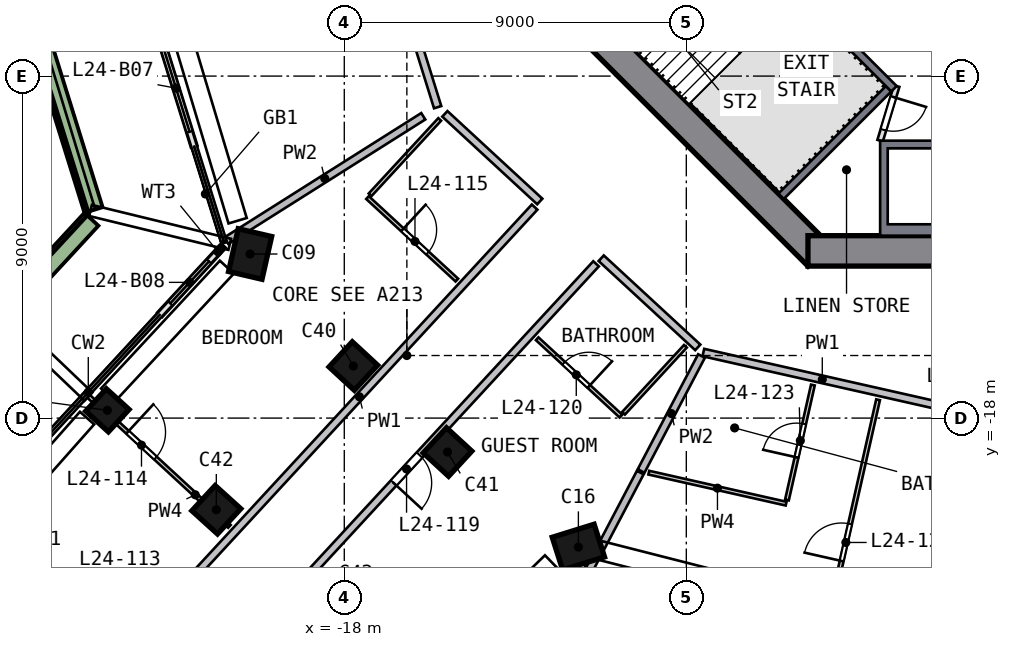
"""IFC4 building model, lengths in metres.
Left out: names, types, materials, properties, quantities, classifications, styles, units other than length and angle.
Written with IfcOpenShell. Run it as: python <this file> out.ifc"""

import sys

from ifc_helpers import new_model, si_unit, direction, frame, frame_2d, origin, origin_2d, place, context, subcontext, project, spatial, polyline, rectangle, outline, extrude, element, fill, save


model = new_model("IFC4")
c1 = context("Model", 3, precision=1e-05, world=origin(), true_north=direction((0.0, 1.0)))
c2 = subcontext(c1, "Body", "Model", "MODEL_VIEW")
j1 = project(units=[si_unit("LENGTHUNIT", "METRE"), si_unit("PLANEANGLEUNIT", "RADIAN")], contexts=[c1])
p1 = place(None, origin())
s1 = spatial("IfcSite", under=j1, at=p1, CompositionType="ELEMENT")
p2 = place(p1, origin())
s2 = spatial("IfcBuilding", under=s1, at=p2, CompositionType="ELEMENT")
p3 = place(p2, frame((0.0, 0.0, 103.5)))
s3 = spatial("IfcBuildingStorey", under=s2, at=p3, CompositionType="ELEMENT", Elevation=103.5)
p4 = place(p3, frame((-20.557, -13.565, 0.0), z_axis=(0.06529081, -0.09721414, 0.99311959), x_axis=(0.226403708, 0.970731294, 0.08013811)))
e1 = element("IfcColumn", 1, at=p4, inside=s3, PredefinedType="COLUMN", context=c2, shape_type="SweptSolid", body=[
    extrude(rectangle(XDim=1.15, YDim=0.9, at=origin_2d()), origin(), (0.0, 0.0, 1.0), 3.212),
])
p5 = place(p3, frame((-24.402, -17.729, 0.0), z_axis=(0.138196736, -0.055097056, 0.988871062), x_axis=(-0.671941399, -0.738723667, 0.052745612)))
e2 = element("IfcColumn", 2, at=p5, inside=s3, PredefinedType="COLUMN", context=c2, shape_type="SweptSolid", body=[
    extrude(rectangle(XDim=0.8, YDim=0.8, at=origin_2d()), origin(), (0.0, 0.0, 1.0), 3.226),
])
p6 = place(p3, frame((-11.963, -21.328, 0.0), z_axis=(0.101860909, -0.0560235, 0.993219876), x_axis=(-0.949753388, -0.302512886, 0.080339625)))
e3 = element("IfcColumn", 3, at=p6, inside=s3, PredefinedType="COLUMN", context=c2, shape_type="SweptSolid", body=[
    extrude(rectangle(XDim=1.15, YDim=0.9, at=origin_2d()), origin(), (0.0, 0.0, 1.0), 3.212),
])
for number, where, z_axis, x_axis in (
    (4, (-17.858, -16.529, 0.0), (0.079, -0.084, 0.993), (-0.679, -0.734, -0.008)),
    (5, (-15.392, -18.806, 0.0), (0.09, -0.072, 0.993), (-0.677, -0.736, 0.008)),
):
    element("IfcColumn", number, at=place(p3, frame(where, z_axis=z_axis, x_axis=x_axis)), inside=s3, PredefinedType="COLUMN", context=c2, shape_type="SweptSolid", body=[
        extrude(rectangle(XDim=0.9, YDim=0.9, at=origin_2d()), origin(), (0.0, 0.0, 1.0), 3.211),
    ])
p7 = place(p3, frame((-21.55, -20.362, 0.0), z_axis=(0.150364243, -0.041427655, 0.987762291), x_axis=(-0.669237704, -0.739662492, 0.070854029)))
e6 = element("IfcColumn", 6, at=p7, inside=s3, PredefinedType="COLUMN", context=c2, shape_type="SweptSolid", body=[
    extrude(rectangle(XDim=0.9, YDim=0.9, at=origin_2d()), origin(), (0.0, 0.0, 1.0), 3.229),
])
p8 = place(p3, frame((-13.717, -5.516, 0.0), z_axis=(0.0, 0.0, 1.0), x_axis=(0.707106781, -0.707106781, 0.0)))
e7 = element("IfcWall", 7, at=p8, inside=s3, PredefinedType="SHEAR", context=c2, shape_type="SweptSolid", body=[
    extrude(rectangle(XDim=11.598, YDim=0.8, at=frame_2d((5.799, 0.0))), origin(), (0.0, 0.0, 1.0), 3.5),
])
p9 = place(p8, frame((2.099, 0.0, 0.0)))
e8 = element("IfcOpeningElement", 8, at=p9, cuts=e7, PredefinedType="OPENING", context=c2, shape_type="SweptSolid", body=[
    extrude(rectangle(XDim=1.2, YDim=2.1, at=frame_2d((0.6, 1.05))), frame((0.0, 0.41, 0.0), z_axis=(0.0, -1.0, 0.0), x_axis=(1.0, 0.0, 0.0)), (0.0, 0.0, 1.0), 0.82),
])
p10 = place(p3, frame((-5.799, -13.6, 0.0), z_axis=(0.0, 0.0, 1.0), x_axis=(1.0, 0.0, 0.0)))
e9 = element("IfcWall", 9, at=p10, inside=s3, PredefinedType="SHEAR", context=c2, shape_type="SweptSolid", body=[
    extrude(rectangle(XDim=11.598, YDim=0.8, at=frame_2d((5.799, 0.0))), origin(), (0.0, 0.0, 1.0), 3.5),
])
p11 = place(p10, frame((4.899, 0.0, 0.0)))
e10 = element("IfcOpeningElement", 10, at=p11, cuts=e9, PredefinedType="OPENING", context=c2, shape_type="SweptSolid", body=[
    extrude(rectangle(XDim=1.8, YDim=2.1, at=frame_2d((0.9, 1.05))), frame((0.0, 0.41, 0.0), z_axis=(0.0, -1.0, 0.0), x_axis=(1.0, 0.0, 0.0)), (0.0, 0.0, 1.0), 0.82),
])
p12 = place(p3, frame((-23.092, -7.183, 0.0), z_axis=(0.0, 0.0, 1.0), x_axis=(0.297049788, -0.954861992, 0.0)))
e11 = element("IfcWall", 11, at=p12, inside=s3, PredefinedType="SOLIDWALL", context=c2, shape_type="SweptSolid", body=[
    extrude(rectangle(XDim=3.836, YDim=0.15, at=frame_2d((1.918, 0.0))), origin(), (0.0, 0.0, 1.0), 2.425),
])
p13 = place(p12, frame((1.035, 0.0, 0.0)))
e12 = element("IfcOpeningElement", 12, at=p13, cuts=e11, PredefinedType="OPENING", context=c2, shape_type="SweptSolid", body=[
    extrude(rectangle(XDim=2.4, YDim=2.4, at=frame_2d((1.2, 1.2))), frame((0.0, 0.085, 0.0), z_axis=(0.0, -1.0, 0.0), x_axis=(1.0, 0.0, 0.0)), (0.0, 0.0, 1.0), 0.17),
])
p14 = place(p3, frame((-21.225, -13.515, 0.0), z_axis=(0.0, 0.0, 1.0), x_axis=(-0.678394477, -0.734697852, 0.0)))
e13 = element("IfcWall", 13, at=p14, inside=s3, PredefinedType="SOLIDWALL", context=c2, shape_type="SweptSolid", body=[
    extrude(rectangle(XDim=2.394, YDim=0.15, at=frame_2d((1.197, 0.0))), origin(), (0.0, 0.0, 1.0), 2.425),
])
p15 = place(p14, frame((0.494, 0.0, 0.0)))
e14 = element("IfcOpeningElement", 14, at=p15, cuts=e13, PredefinedType="OPENING", context=c2, shape_type="SweptSolid", body=[
    extrude(rectangle(XDim=1.5, YDim=2.4, at=frame_2d((0.75, 1.2))), frame((0.0, 0.085, 0.0), z_axis=(0.0, -1.0, 0.0), x_axis=(1.0, 0.0, 0.0)), (0.0, 0.0, 1.0), 0.17),
])
p16 = place(p3, frame((-27.762, -2.353, 0.0), z_axis=(0.0, 0.0, 1.0), x_axis=(0.297028475, -0.954868622, 0.0)))
e15 = element("IfcWall", 15, at=p16, inside=s3, PredefinedType="SOLIDWALL", context=c2, shape_type="SweptSolid", body=[
    extrude(rectangle(XDim=10.652, YDim=0.5, at=frame_2d((5.326, 0.0))), origin(), (0.0, 0.0, 1.0), 0.7),
])
p17 = place(p3, frame((-24.653, -12.768, 0.0), z_axis=(0.0, 0.0, 1.0), x_axis=(-0.678410385, -0.734683162, 0.0)))
e16 = element("IfcWall", 16, at=p17, inside=s3, PredefinedType="SOLIDWALL", context=c2, shape_type="SweptSolid", body=[
    extrude(rectangle(XDim=8.794, YDim=0.5, at=frame_2d((4.397, 0.0))), origin(), (0.0, 0.0, 1.0), 0.7),
])
p18 = place(p3, origin())
e17 = element("IfcWall", 17, at=p18, inside=s3, PredefinedType="SOLIDWALL", context=c2, shape_type="SweptSolid", body=[
    extrude(outline(polyline([(-1.2, -13.2), (-3.9, -13.2), (-3.9, -10.7), (-1.2, -10.7), (-1.2, -13.2)]), holes=[polyline([(-3.7, -10.9), (-3.7, -12.9), (-1.4, -12.9), (-1.4, -10.9), (-3.7, -10.9)])]), origin(), (0.0, 0.0, 1.0), 3.19),
])
p19 = place(p3, frame((-3.535, -9.334, 0.0), z_axis=(0.0, 0.0, 1.0), x_axis=(-0.707106781, 0.707106781, 0.0)))
e18 = element("IfcWall", 18, at=p19, inside=s3, PredefinedType="SOLIDWALL", context=c2, shape_type="SweptSolid", body=[
    extrude(rectangle(XDim=8.2, YDim=0.2, at=frame_2d((4.1, 0.0))), origin(), (0.0, 0.0, 1.0), 3.19),
])
p20 = place(p19, frame((6.6, 0.0, 0.0)))
e19 = element("IfcOpeningElement", 19, at=p20, cuts=e18, PredefinedType="OPENING", context=c2, shape_type="SweptSolid", body=[
    extrude(rectangle(XDim=1.2, YDim=2.1, at=frame_2d((0.6, 1.05))), frame((0.0, 0.11, 0.0), z_axis=(0.0, -1.0, 0.0), x_axis=(1.0, 0.0, 0.0)), (0.0, 0.0, 1.0), 0.22),
])
p21 = place(p3, frame((-3.677, -9.334, 0.0), z_axis=(0.0, 0.0, 1.0), x_axis=(-0.707106781, -0.707106781, 0.0)))
e20 = element("IfcWall", 20, at=p21, inside=s3, PredefinedType="SOLIDWALL", context=c2, shape_type="SweptSolid", body=[
    extrude(rectangle(XDim=4.0, YDim=0.2, at=frame_2d((2.0, 0.0))), origin(), (0.0, 0.0, 1.0), 3.19),
])
p22 = place(p3, frame((-3.465, -9.263, 0.0), z_axis=(0.0, 0.0, 1.0), x_axis=(-0.289808785, -0.957084567, 0.0)))
e21 = element("IfcWall", 21, at=p22, inside=s3, PredefinedType="PARTITIONING", context=c2, shape_type="SweptSolid", body=[
    extrude(rectangle(XDim=1.501, YDim=0.15, at=frame_2d((0.75, 0.0))), origin(), (0.0, 0.0, 1.0), 3.19),
])
p23 = place(p22, frame((0.301, 0.0, 0.0)))
e22 = element("IfcOpeningElement", 22, at=p23, cuts=e21, PredefinedType="OPENING", context=c2, shape_type="SweptSolid", body=[
    extrude(rectangle(XDim=0.9, YDim=2.1, at=frame_2d((0.45, 1.05))), frame((0.0, 0.085, 0.0), z_axis=(0.0, -1.0, 0.0), x_axis=(1.0, 0.0, 0.0)), (0.0, 0.0, 1.0), 0.17),
])
p24 = place(p3, frame((-24.485, -24.894, 0.0), z_axis=(0.0, 0.0, 1.0), x_axis=(0.678409972, 0.734683544, 0.0)))
e23 = element("IfcWall", 23, at=p24, inside=s3, PredefinedType="SOLIDWALL", context=c2, shape_type="SweptSolid", body=[
    extrude(rectangle(XDim=16.942, YDim=0.2, at=frame_2d((8.471, 0.0))), origin(), (0.0, 0.0, 1.0), 3.19),
])
p25 = place(p24, frame((2.15, 0.0, 0.0)))
e24 = element("IfcOpeningElement", 24, at=p25, cuts=e23, PredefinedType="OPENING", context=c2, shape_type="SweptSolid", body=[
    extrude(rectangle(XDim=1.0, YDim=2.1, at=frame_2d((0.5, 1.05))), frame((0.0, 0.11, 0.0), z_axis=(0.0, -1.0, 0.0), x_axis=(1.0, 0.0, 0.0)), (0.0, 0.0, 1.0), 0.22),
])
p26 = place(p3, frame((-11.375, -13.94, 0.0), z_axis=(0.0, 0.0, 1.0), x_axis=(-0.67841775, -0.734676361, 0.0)))
e25 = element("IfcWall", 25, at=p26, inside=s3, PredefinedType="SOLIDWALL", context=c2, shape_type="SweptSolid", body=[
    extrude(rectangle(XDim=16.942, YDim=0.2, at=frame_2d((8.471, 0.0))), origin(), (0.0, 0.0, 1.0), 3.19),
])
p27 = place(p26, frame((6.85, 0.0, 0.0)))
e26 = element("IfcOpeningElement", 26, at=p27, cuts=e25, PredefinedType="OPENING", context=c2, shape_type="SweptSolid", body=[
    extrude(rectangle(XDim=1.0, YDim=2.1, at=frame_2d((0.5, 1.05))), frame((0.0, 0.11, 0.0), z_axis=(0.0, -1.0, 0.0), x_axis=(1.0, 0.0, 0.0)), (0.0, 0.0, 1.0), 0.22),
])
p28 = place(p3, frame((-18.37, -0.732, 0.0), z_axis=(0.0, 0.0, 1.0), x_axis=(0.297037443, -0.954865832, 0.0)))
e27 = element("IfcWall", 27, at=p28, inside=s3, PredefinedType="SOLIDWALL", context=c2, shape_type="SweptSolid", body=[
    extrude(rectangle(XDim=9.516, YDim=0.2, at=frame_2d((4.758, 0.0))), origin(), (0.0, 0.0, 1.0), 3.19),
])
p29 = place(p3, frame((-15.354, -9.994, 0.0), z_axis=(0.0, 0.0, 1.0), x_axis=(0.734696063, -0.678396414, 0.0)))
e28 = element("IfcWall", 28, at=p29, inside=s3, PredefinedType="SOLIDWALL", context=c2, shape_type="SweptSolid", body=[
    extrude(rectangle(XDim=3.4, YDim=0.2, at=frame_2d((1.7, 0.0))), origin(), (0.0, 0.0, 1.0), 3.19),
])
p30 = place(p3, frame((-11.24, -13.793, 0.0), z_axis=(0.0, 0.0, 1.0), x_axis=(0.734711421, -0.678379781, 0.0)))
e29 = element("IfcWall", 29, at=p30, inside=s3, PredefinedType="SOLIDWALL", context=c2, shape_type="SweptSolid", body=[
    extrude(rectangle(XDim=3.458, YDim=0.2, at=frame_2d((1.729, 0.0))), origin(), (0.0, 0.0, 1.0), 3.19),
])
p31 = place(p3, frame((0.731, -18.37, 0.0), z_axis=(0.0, 0.0, 1.0), x_axis=(-0.9754634, 0.220161658, 0.0)))
e30 = element("IfcWall", 30, at=p31, inside=s3, PredefinedType="SOLIDWALL", context=c2, shape_type="SweptSolid", body=[
    extrude(rectangle(XDim=9.517, YDim=0.2, at=frame_2d((4.758, 0.0))), origin(), (0.0, 0.0, 1.0), 3.19),
])
p32 = place(p31, frame((1.9, 0.0, 0.0)))
e31 = element("IfcOpeningElement", 31, at=p32, cuts=e30, PredefinedType="OPENING", context=c2, shape_type="SweptSolid", body=[
    extrude(rectangle(XDim=1.0, YDim=2.1, at=frame_2d((0.5, 1.05))), frame((0.0, 0.11, 0.0), z_axis=(0.0, -1.0, 0.0), x_axis=(1.0, 0.0, 0.0)), (0.0, 0.0, 1.0), 0.22),
])
p33 = place(p3, frame((-15.921, -10.057, 0.0), z_axis=(0.0, 0.0, 1.0), x_axis=(-0.845445381, -0.534061895, 0.0)))
e32 = element("IfcWall", 32, at=p33, inside=s3, PredefinedType="SOLIDWALL", context=c2, shape_type="SweptSolid", body=[
    extrude(rectangle(XDim=6.132, YDim=0.2, at=frame_2d((3.066, 0.0))), origin(), (0.0, 0.0, 1.0), 3.19),
])
p34 = place(p3, frame((-10.211, -19.433, 0.0), z_axis=(0.0, 0.0, 1.0), x_axis=(-0.465151616, -0.885231029, 0.0)))
e33 = element("IfcWall", 33, at=p34, inside=s3, PredefinedType="SOLIDWALL", context=c2, shape_type="SweptSolid", body=[
    extrude(rectangle(XDim=3.012, YDim=0.2, at=frame_2d((1.506, 0.0))), origin(), (0.0, 0.0, 1.0), 3.19),
])
p35 = place(p3, frame((-8.6, -16.366, 0.0), z_axis=(0.0, 0.0, 1.0), x_axis=(-0.465148797, -0.88523251, 0.0)))
e34 = element("IfcWall", 34, at=p35, inside=s3, PredefinedType="SOLIDWALL", context=c2, shape_type="SweptSolid", body=[
    extrude(rectangle(XDim=3.418, YDim=0.2, at=frame_2d((1.709, 0.0))), origin(), (0.0, 0.0, 1.0), 3.19),
])
p36 = place(p3, frame((-24.732, -17.423, 0.0), z_axis=(0.0, 0.0, 1.0), x_axis=(0.734660708, -0.678434701, 0.0)))
e35 = element("IfcWall", 35, at=p36, inside=s3, PredefinedType="PARTITIONING", context=c2, shape_type="SweptSolid", body=[
    extrude(rectangle(XDim=5.05, YDim=0.1, at=frame_2d((2.525, 0.0))), origin(), (0.0, 0.0, 1.0), 3.19),
])
p37 = place(p36, frame((1.4, 0.0, 0.0)))
e36 = element("IfcOpeningElement", 36, at=p37, cuts=e35, PredefinedType="OPENING", context=c2, shape_type="SweptSolid", body=[
    extrude(rectangle(XDim=1.0, YDim=2.1, at=frame_2d((0.5, 1.05))), frame((0.0, 0.06, 0.0), z_axis=(0.0, -1.0, 0.0), x_axis=(1.0, 0.0, 0.0)), (0.0, 0.0, 1.0), 0.12),
])
p38 = place(p3, frame((-15.489, -10.141, 0.0), z_axis=(0.0, 0.0, 1.0), x_axis=(-0.678426553, -0.734668232, 0.0)))
e37 = element("IfcWall", 37, at=p38, inside=s3, PredefinedType="PARTITIONING", context=c2, shape_type="SweptSolid", body=[
    extrude(rectangle(XDim=2.7, YDim=0.1, at=frame_2d((1.35, 0.0))), origin(), (0.0, 0.0, 1.0), 3.19),
])
p39 = place(p3, frame((-17.389, -12.198, 0.0), z_axis=(0.0, 0.0, 1.0), x_axis=(0.734698137, -0.678394168, 0.0)))
e38 = element("IfcWall", 38, at=p39, inside=s3, PredefinedType="PARTITIONING", context=c2, shape_type="SweptSolid", body=[
    extrude(rectangle(XDim=3.2, YDim=0.1, at=frame_2d((1.6, 0.0))), origin(), (0.0, 0.0, 1.0), 3.19),
])
p40 = place(p39, frame((1.25, 0.0, 0.0)))
e39 = element("IfcOpeningElement", 39, at=p40, cuts=e38, PredefinedType="OPENING", context=c2, shape_type="SweptSolid", body=[
    extrude(rectangle(XDim=0.9, YDim=2.1, at=frame_2d((0.45, 1.05))), frame((0.0, 0.06, 0.0), z_axis=(0.0, -1.0, 0.0), x_axis=(1.0, 0.0, 0.0)), (0.0, 0.0, 1.0), 0.12),
])
p41 = place(p3, frame((-12.924, -15.912, 0.0), z_axis=(0.0, 0.0, 1.0), x_axis=(0.734663036, -0.678432181, 0.0)))
e40 = element("IfcWall", 40, at=p41, inside=s3, PredefinedType="PARTITIONING", context=c2, shape_type="SweptSolid", body=[
    extrude(rectangle(XDim=3.0, YDim=0.1, at=frame_2d((1.5, 0.0))), origin(), (0.0, 0.0, 1.0), 3.19),
])
p42 = place(p41, frame((0.95, 0.0, 0.0)))
e41 = element("IfcOpeningElement", 41, at=p42, cuts=e40, PredefinedType="OPENING", context=c2, shape_type="SweptSolid", body=[
    extrude(rectangle(XDim=0.9, YDim=2.1, at=frame_2d((0.45, 1.05))), frame((0.0, 0.06, 0.0), z_axis=(0.0, -1.0, 0.0), x_axis=(1.0, 0.0, 0.0)), (0.0, 0.0, 1.0), 0.12),
])
p43 = place(p3, frame((-9.024, -16.111, 0.0), z_axis=(0.0, 0.0, 1.0), x_axis=(-0.678419519, -0.734674728, 0.0)))
e42 = element("IfcWall", 42, at=p43, inside=s3, PredefinedType="PARTITIONING", context=c2, shape_type="SweptSolid", body=[
    extrude(rectangle(XDim=2.4, YDim=0.1, at=frame_2d((1.2, 0.0))), origin(), (0.0, 0.0, 1.0), 3.19),
])
p44 = place(p3, frame((-9.987, -19.436, 0.0), z_axis=(0.0, 0.0, 1.0), x_axis=(0.975451051, -0.220216363, 0.0)))
e43 = element("IfcWall", 43, at=p44, inside=s3, PredefinedType="PARTITIONING", context=c2, shape_type="SweptSolid", body=[
    extrude(rectangle(XDim=3.704, YDim=0.1, at=frame_2d((1.852, 0.0))), origin(), (0.0, 0.0, 1.0), 3.19),
])
p45 = place(p3, frame((-6.352, -20.154, 0.0), z_axis=(0.0, 0.0, 1.0), x_axis=(0.220123085, 0.975472105, 0.0)))
e44 = element("IfcWall", 44, at=p45, inside=s3, PredefinedType="PARTITIONING", context=c2, shape_type="SweptSolid", body=[
    extrude(rectangle(XDim=3.1, YDim=0.1, at=frame_2d((1.55, 0.0))), origin(), (0.0, 0.0, 1.0), 3.19),
])
p46 = place(p45, frame((1.15, 0.0, 0.0)))
e45 = element("IfcOpeningElement", 45, at=p46, cuts=e44, PredefinedType="OPENING", context=c2, shape_type="SweptSolid", body=[
    extrude(rectangle(XDim=0.9, YDim=2.1, at=frame_2d((0.45, 1.05))), frame((0.0, 0.06, 0.0), z_axis=(0.0, -1.0, 0.0), x_axis=(1.0, 0.0, 0.0)), (0.0, 0.0, 1.0), 0.12),
])
p47 = place(p3, frame((-5.308, -23.517, 0.0), z_axis=(0.0, 0.0, 1.0), x_axis=(0.220203604, 0.975453932, 0.0)))
e46 = element("IfcWall", 46, at=p47, inside=s3, PredefinedType="PARTITIONING", context=c2, shape_type="SweptSolid", body=[
    extrude(rectangle(XDim=6.15, YDim=0.1, at=frame_2d((3.075, 0.0))), origin(), (0.0, 0.0, 1.0), 3.19),
])
p48 = place(p47, frame((1.8, 0.0, 0.0)))
e47 = element("IfcOpeningElement", 47, at=p48, cuts=e46, PredefinedType="OPENING", context=c2, shape_type="SweptSolid", body=[
    extrude(rectangle(XDim=1.0, YDim=2.1, at=frame_2d((0.5, 1.05))), frame((0.0, 0.06, 0.0), z_axis=(0.0, -1.0, 0.0), x_axis=(1.0, 0.0, 0.0)), (0.0, 0.0, 1.0), 0.12),
])
p49 = place(p13, origin())
e48 = element("IfcDoor", 48, at=p49, inside=s3, OperationType="SLIDING_TO_LEFT", PredefinedType="DOOR", context=c2, shape_type="SweptSolid", body=[
    extrude(rectangle(XDim=2.4, YDim=2.4, at=frame_2d((1.2, 1.2))), frame((0.0, 0.025, 0.0), z_axis=(0.0, -1.0, 0.0), x_axis=(1.0, 0.0, 0.0)), (0.0, 0.0, 1.0), 0.05),
])
fill(e12, e48)
p50 = place(p15, origin())
e49 = element("IfcDoor", 49, at=p50, inside=s3, OperationType="SLIDING_TO_LEFT", PredefinedType="DOOR", context=c2, shape_type="SweptSolid", body=[
    extrude(rectangle(XDim=1.5, YDim=2.4, at=frame_2d((0.75, 1.2))), frame((0.0, 0.025, 0.0), z_axis=(0.0, -1.0, 0.0), x_axis=(1.0, 0.0, 0.0)), (0.0, 0.0, 1.0), 0.05),
])
fill(e14, e49)
p51 = place(p23, origin())
e50 = element("IfcDoor", 50, at=p51, inside=s3, OperationType="SINGLE_SWING_LEFT", PredefinedType="DOOR", context=c2, shape_type="SweptSolid", body=[
    extrude(rectangle(XDim=0.9, YDim=2.1, at=frame_2d((0.45, 1.05))), frame((0.0, 0.025, 0.0), z_axis=(0.0, -1.0, 0.0), x_axis=(1.0, 0.0, 0.0)), (0.0, 0.0, 1.0), 0.05),
])
fill(e22, e50)
p52 = place(p37, origin())
e51 = element("IfcDoor", 51, at=p52, inside=s3, OperationType="SINGLE_SWING_LEFT", PredefinedType="DOOR", context=c2, shape_type="SweptSolid", body=[
    extrude(rectangle(XDim=1.0, YDim=2.1, at=frame_2d((0.5, 1.05))), frame((0.0, 0.025, 0.0), z_axis=(0.0, -1.0, 0.0), x_axis=(1.0, 0.0, 0.0)), (0.0, 0.0, 1.0), 0.05),
])
fill(e36, e51)
p53 = place(p40, origin())
e52 = element("IfcDoor", 52, at=p53, inside=s3, OperationType="SINGLE_SWING_LEFT", PredefinedType="DOOR", context=c2, shape_type="SweptSolid", body=[
    extrude(rectangle(XDim=0.9, YDim=2.1, at=frame_2d((0.45, 1.05))), frame((0.0, 0.025, 0.0), z_axis=(0.0, -1.0, 0.0), x_axis=(1.0, 0.0, 0.0)), (0.0, 0.0, 1.0), 0.05),
])
fill(e39, e52)
p54 = place(p27, origin())
e53 = element("IfcDoor", 53, at=p54, inside=s3, OperationType="SINGLE_SWING_RIGHT", PredefinedType="DOOR", context=c2, shape_type="SweptSolid", body=[
    extrude(rectangle(XDim=1.0, YDim=2.1, at=frame_2d((0.5, 1.05))), frame((0.0, 0.025, 0.0), z_axis=(0.0, -1.0, 0.0), x_axis=(1.0, 0.0, 0.0)), (0.0, 0.0, 1.0), 0.05),
])
fill(e26, e53)
p55 = place(p42, origin())
e54 = element("IfcDoor", 54, at=p55, inside=s3, OperationType="SINGLE_SWING_RIGHT", PredefinedType="DOOR", context=c2, shape_type="SweptSolid", body=[
    extrude(rectangle(XDim=0.9, YDim=2.1, at=frame_2d((0.45, 1.05))), frame((0.0, 0.025, 0.0), z_axis=(0.0, -1.0, 0.0), x_axis=(1.0, 0.0, 0.0)), (0.0, 0.0, 1.0), 0.05),
])
fill(e41, e54)
p56 = place(p48, origin())
e55 = element("IfcDoor", 55, at=p56, inside=s3, OperationType="SINGLE_SWING_LEFT", PredefinedType="DOOR", context=c2, shape_type="SweptSolid", body=[
    extrude(rectangle(XDim=1.0, YDim=2.1, at=frame_2d((0.5, 1.05))), frame((0.0, 0.025, 0.0), z_axis=(0.0, -1.0, 0.0), x_axis=(1.0, 0.0, 0.0)), (0.0, 0.0, 1.0), 0.05),
])
fill(e47, e55)
p57 = place(p46, origin())
e56 = element("IfcDoor", 56, at=p57, inside=s3, OperationType="SINGLE_SWING_LEFT", PredefinedType="DOOR", context=c2, shape_type="SweptSolid", body=[
    extrude(rectangle(XDim=0.9, YDim=2.1, at=frame_2d((0.45, 1.05))), frame((0.0, 0.025, 0.0), z_axis=(0.0, -1.0, 0.0), x_axis=(1.0, 0.0, 0.0)), (0.0, 0.0, 1.0), 0.05),
])
fill(e45, e56)
save(model, sys.argv[1])
